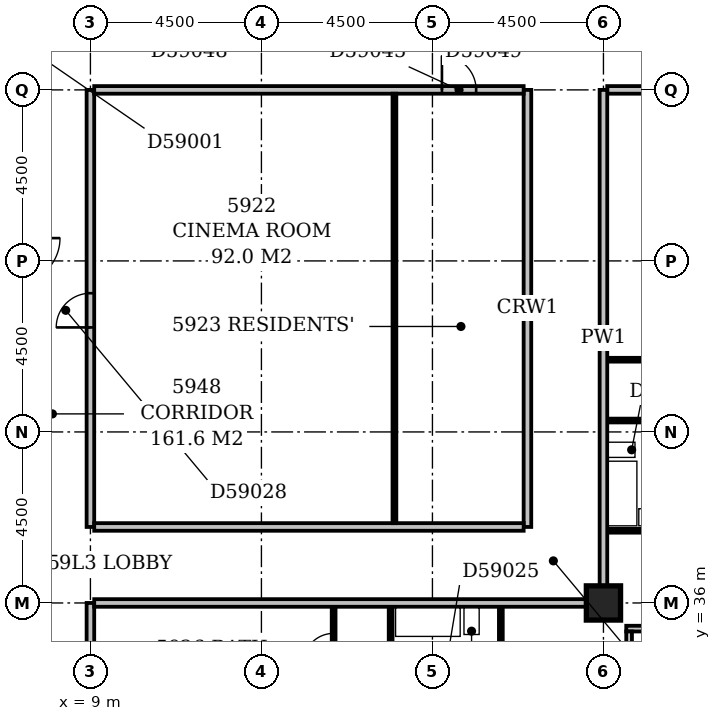
"""IFC4 building model, lengths in metres.
Left out: names, types, materials, properties, quantities, classifications, styles, units other than length and angle.
Written with IfcOpenShell. Run it as: python <this file> out.ifc"""

import sys

from ifc_helpers import new_model, si_unit, direction, frame, frame_2d, origin, origin_2d, place, context, subcontext, project, spatial, rectangle, extrude, element, fill, save


model = new_model("IFC4")
c1 = context("Model", 3, precision=1e-05, world=origin(), true_north=direction((0.0, 1.0)))
c2 = subcontext(c1, "Body", "Model", "MODEL_VIEW")
j1 = project(units=[si_unit("LENGTHUNIT", "METRE"), si_unit("PLANEANGLEUNIT", "RADIAN")], contexts=[c1])
p1 = place(None, origin())
s1 = spatial("IfcSite", under=j1, at=p1, CompositionType="ELEMENT")
p2 = place(p1, origin())
s2 = spatial("IfcBuilding", under=s1, at=p2, CompositionType="ELEMENT")
p3 = place(p2, frame((0.0, 0.0, 229.4)))
s3 = spatial("IfcBuildingStorey", under=s2, at=p3, CompositionType="ELEMENT", Elevation=229.4)
p4 = place(p3, frame((22.5, 36.0, -0.3), z_axis=(0.0, 0.0, 1.0), x_axis=(1.0, 0.0, 0.0)))
e1 = element("IfcColumn", 1, at=p4, inside=s3, PredefinedType="COLUMN", context=c2, shape_type="SweptSolid", body=[
    extrude(rectangle(XDim=0.9, YDim=0.9, at=origin_2d()), origin(), (0.0, 0.0, 1.0), 3.55),
])
p5 = place(p3, frame((23.175, 17.4, 0.0), z_axis=(0.0, 0.0, 1.0), x_axis=(0.0, 1.0, 0.0)))
e2 = element("IfcWall", 2, at=p5, inside=s3, PredefinedType="STANDARD", context=c2, shape_type="SweptSolid", body=[
    extrude(rectangle(XDim=17.85, YDim=0.15, at=frame_2d((8.925, 0.0))), origin(), (0.0, 0.0, 1.0), 2.7),
])
p6 = place(p5, frame((2.876, 0.0, 0.6)))
e3 = element("IfcOpeningElement", 3, at=p6, cuts=e2, PredefinedType="OPENING", context=c2, shape_type="SweptSolid", body=[
    extrude(rectangle(XDim=1.5, YDim=1.8, at=frame_2d((0.75, 0.9))), frame((0.0, 0.087, 0.0), z_axis=(0.0, -1.0, 0.0), x_axis=(1.0, 0.0, 0.0)), (0.0, 0.0, 1.0), 0.174),
])
p7 = place(p5, frame((6.15, 0.0, 0.6)))
e4 = element("IfcOpeningElement", 4, at=p7, cuts=e2, PredefinedType="OPENING", context=c2, shape_type="SweptSolid", body=[
    extrude(rectangle(XDim=2.4, YDim=1.8, at=frame_2d((1.2, 0.9))), frame((0.0, 0.087, 0.0), z_axis=(0.0, -1.0, 0.0), x_axis=(1.0, 0.0, 0.0)), (0.0, 0.0, 1.0), 0.174),
])
p8 = place(p5, frame((10.65, 0.0, 0.6)))
e5 = element("IfcOpeningElement", 5, at=p8, cuts=e2, PredefinedType="OPENING", context=c2, shape_type="SweptSolid", body=[
    extrude(rectangle(XDim=2.4, YDim=1.8, at=frame_2d((1.2, 0.9))), frame((0.0, 0.087, 0.0), z_axis=(0.0, -1.0, 0.0), x_axis=(1.0, 0.0, 0.0)), (0.0, 0.0, 1.0), 0.174),
])
p9 = place(p5, frame((15.15, 0.0, 0.6)))
e6 = element("IfcOpeningElement", 6, at=p9, cuts=e2, PredefinedType="OPENING", context=c2, shape_type="SweptSolid", body=[
    extrude(rectangle(XDim=2.4, YDim=1.8, at=frame_2d((1.2, 0.9))), frame((0.0, 0.087, 0.0), z_axis=(0.0, -1.0, 0.0), x_axis=(1.0, 0.0, 0.0)), (0.0, 0.0, 1.0), 0.174),
])
p10 = place(p3, frame((23.1, 35.325, 0.0), z_axis=(0.0, 0.0, 1.0), x_axis=(1.0, 0.0, 0.0)))
e7 = element("IfcWall", 7, at=p10, inside=s3, PredefinedType="STANDARD", context=c2, shape_type="SweptSolid", body=[
    extrude(rectangle(XDim=27.15, YDim=0.15, at=frame_2d((13.575, 0.0))), origin(), (0.0, 0.0, 1.0), 2.7),
])
p11 = place(p10, frame((2.043, 0.0, 0.6)))
e8 = element("IfcOpeningElement", 8, at=p11, cuts=e7, PredefinedType="OPENING", context=c2, shape_type="SweptSolid", body=[
    extrude(rectangle(XDim=1.2, YDim=1.8, at=frame_2d((0.6, 0.9))), frame((0.0, 0.087, 0.0), z_axis=(0.0, -1.0, 0.0), x_axis=(1.0, 0.0, 0.0)), (0.0, 0.0, 1.0), 0.174),
])
p12 = place(p10, frame((4.95, 0.0, 0.6)))
e9 = element("IfcOpeningElement", 9, at=p12, cuts=e7, PredefinedType="OPENING", context=c2, shape_type="SweptSolid", body=[
    extrude(rectangle(XDim=2.4, YDim=1.8, at=frame_2d((1.2, 0.9))), frame((0.0, 0.087, 0.0), z_axis=(0.0, -1.0, 0.0), x_axis=(1.0, 0.0, 0.0)), (0.0, 0.0, 1.0), 0.174),
])
p13 = place(p10, frame((9.45, 0.0, 0.6)))
e10 = element("IfcOpeningElement", 10, at=p13, cuts=e7, PredefinedType="OPENING", context=c2, shape_type="SweptSolid", body=[
    extrude(rectangle(XDim=2.4, YDim=1.8, at=frame_2d((1.2, 0.9))), frame((0.0, 0.087, 0.0), z_axis=(0.0, -1.0, 0.0), x_axis=(1.0, 0.0, 0.0)), (0.0, 0.0, 1.0), 0.174),
])
p14 = place(p10, frame((13.95, 0.0, 0.6)))
e11 = element("IfcOpeningElement", 11, at=p14, cuts=e7, PredefinedType="OPENING", context=c2, shape_type="SweptSolid", body=[
    extrude(rectangle(XDim=2.4, YDim=1.8, at=frame_2d((1.2, 0.9))), frame((0.0, 0.087, 0.0), z_axis=(0.0, -1.0, 0.0), x_axis=(1.0, 0.0, 0.0)), (0.0, 0.0, 1.0), 0.174),
])
p15 = place(p10, frame((18.45, 0.0, 0.6)))
e12 = element("IfcOpeningElement", 12, at=p15, cuts=e7, PredefinedType="OPENING", context=c2, shape_type="SweptSolid", body=[
    extrude(rectangle(XDim=2.4, YDim=1.8, at=frame_2d((1.2, 0.9))), frame((0.0, 0.087, 0.0), z_axis=(0.0, -1.0, 0.0), x_axis=(1.0, 0.0, 0.0)), (0.0, 0.0, 1.0), 0.174),
])
p16 = place(p10, frame((22.68, 0.0, 0.6)))
e13 = element("IfcOpeningElement", 13, at=p16, cuts=e7, PredefinedType="OPENING", context=c2, shape_type="SweptSolid", body=[
    extrude(rectangle(XDim=1.8, YDim=1.8, at=frame_2d((0.9, 0.9))), frame((0.0, 0.087, 0.0), z_axis=(0.0, -1.0, 0.0), x_axis=(1.0, 0.0, 0.0)), (0.0, 0.0, 1.0), 0.174),
])
p17 = place(p3, frame((9.0, 18.45, 0.0), z_axis=(0.0, 0.0, 1.0), x_axis=(0.0, 1.0, 0.0)))
e14 = element("IfcWall", 14, at=p17, inside=s3, PredefinedType="PARTITIONING", context=c2, shape_type="SweptSolid", body=[
    extrude(rectangle(XDim=17.55, YDim=0.2, at=frame_2d((8.775, 0.0))), origin(), (0.0, 0.0, 1.0), 3.25),
])
p18 = place(p17, frame((13.85, 0.0, 0.0)))
e15 = element("IfcOpeningElement", 15, at=p18, cuts=e14, PredefinedType="OPENING", context=c2, shape_type="SweptSolid", body=[
    extrude(rectangle(XDim=1.0, YDim=2.1, at=frame_2d((0.5, 1.05))), frame((0.0, 0.112, 0.0), z_axis=(0.0, -1.0, 0.0), x_axis=(1.0, 0.0, 0.0)), (0.0, 0.0, 1.0), 0.224),
])
p19 = place(p17, frame((3.25, 0.0, 0.0)))
e16 = element("IfcOpeningElement", 16, at=p19, cuts=e14, PredefinedType="OPENING", context=c2, shape_type="SweptSolid", body=[
    extrude(rectangle(XDim=1.0, YDim=2.1, at=frame_2d((0.5, 1.05))), frame((0.0, 0.112, 0.0), z_axis=(0.0, -1.0, 0.0), x_axis=(1.0, 0.0, 0.0)), (0.0, 0.0, 1.0), 0.224),
])
p20 = place(p3, frame((16.9, 27.1, 0.0), z_axis=(0.0, 0.0, 1.0), x_axis=(0.0, 1.0, 0.0)))
e17 = element("IfcWall", 17, at=p20, inside=s3, PredefinedType="PARTITIONING", context=c2, shape_type="SweptSolid", body=[
    extrude(rectangle(XDim=8.8, YDim=0.1, at=frame_2d((4.4, 0.0))), origin(), (0.0, 0.0, 1.0), 3.25),
])
p21 = place(p20, frame((1.7, 0.0, 0.0)))
e18 = element("IfcOpeningElement", 18, at=p21, cuts=e17, PredefinedType="OPENING", context=c2, shape_type="SweptSolid", body=[
    extrude(rectangle(XDim=0.9, YDim=2.1, at=frame_2d((0.45, 1.05))), frame((0.0, 0.062, 0.0), z_axis=(0.0, -1.0, 0.0), x_axis=(1.0, 0.0, 0.0)), (0.0, 0.0, 1.0), 0.124),
])
p22 = place(p20, frame((5.05, 0.0, 0.0)))
e19 = element("IfcOpeningElement", 19, at=p22, cuts=e17, PredefinedType="OPENING", context=c2, shape_type="SweptSolid", body=[
    extrude(rectangle(XDim=0.9, YDim=2.1, at=frame_2d((0.45, 1.05))), frame((0.0, 0.062, 0.0), z_axis=(0.0, -1.0, 0.0), x_axis=(1.0, 0.0, 0.0)), (0.0, 0.0, 1.0), 0.124),
])
p23 = place(p3, frame((15.4, 33.6, 0.0), z_axis=(0.0, 0.0, 1.0), x_axis=(0.0, 1.0, 0.0)))
e20 = element("IfcWall", 20, at=p23, inside=s3, PredefinedType="PARTITIONING", context=c2, shape_type="SweptSolid", body=[
    extrude(rectangle(XDim=2.3, YDim=0.1, at=frame_2d((1.15, 0.0))), origin(), (0.0, 0.0, 1.0), 3.25),
])
p24 = place(p23, frame((0.8, 0.0, 0.0)))
e21 = element("IfcOpeningElement", 21, at=p24, cuts=e20, PredefinedType="OPENING", context=c2, shape_type="SweptSolid", body=[
    extrude(rectangle(XDim=0.8, YDim=2.1, at=frame_2d((0.4, 1.05))), frame((0.0, 0.062, 0.0), z_axis=(0.0, -1.0, 0.0), x_axis=(1.0, 0.0, 0.0)), (0.0, 0.0, 1.0), 0.124),
])
p25 = place(p3, frame((19.8, 33.7, 0.0), z_axis=(0.0, 0.0, 1.0), x_axis=(0.0, 1.0, 0.0)))
e22 = element("IfcWall", 22, at=p25, inside=s3, PredefinedType="PLUMBINGWALL", context=c2, shape_type="SweptSolid", body=[
    extrude(rectangle(XDim=2.2, YDim=0.1, at=frame_2d((1.1, 0.0))), origin(), (0.0, 0.0, 1.0), 3.25),
])
p26 = place(p3, frame((9.1, 36.0, 0.0), z_axis=(0.0, 0.0, 1.0), x_axis=(1.0, 0.0, 0.0)))
e23 = element("IfcWall", 23, at=p26, inside=s3, PredefinedType="PARTITIONING", context=c2, shape_type="SweptSolid", body=[
    extrude(rectangle(XDim=12.95, YDim=0.2, at=frame_2d((6.475, 0.0))), origin(), (0.0, 0.0, 1.0), 3.25),
])
p27 = place(p3, frame((22.5, 36.45, 0.0), z_axis=(0.0, 0.0, 1.0), x_axis=(0.0, 1.0, 0.0)))
e24 = element("IfcWall", 24, at=p27, inside=s3, PredefinedType="PARTITIONING", context=c2, shape_type="SweptSolid", body=[
    extrude(rectangle(XDim=13.05, YDim=0.2, at=frame_2d((6.525, 0.0))), origin(), (0.0, 0.0, 1.0), 3.25),
])
p28 = place(p3, frame((22.6, 37.9, 0.0), z_axis=(0.0, 0.0, 1.0), x_axis=(1.0, 0.0, 0.0)))
e25 = element("IfcWall", 25, at=p28, inside=s3, PredefinedType="PLUMBINGWALL", context=c2, shape_type="SweptSolid", body=[
    extrude(rectangle(XDim=2.15, YDim=0.1, at=frame_2d((1.075, 0.0))), origin(), (0.0, 0.0, 1.0), 3.25),
])
p29 = place(p3, frame((9.0, 38.0, 0.0), z_axis=(0.0, 0.0, 1.0), x_axis=(0.0, 1.0, 0.0)))
e26 = element("IfcWall", 26, at=p29, inside=s3, PredefinedType="PARTITIONING", context=c2, shape_type="SweptSolid", body=[
    extrude(rectangle(XDim=11.5, YDim=0.2, at=frame_2d((5.75, 0.0))), origin(), (0.0, 0.0, 1.0), 3.25),
])
p30 = place(p29, frame((5.25, 0.0, 0.0)))
e27 = element("IfcOpeningElement", 27, at=p30, cuts=e26, PredefinedType="OPENING", context=c2, shape_type="SweptSolid", body=[
    extrude(rectangle(XDim=0.9, YDim=2.1, at=frame_2d((0.45, 1.05))), frame((0.0, 0.112, 0.0), z_axis=(0.0, -1.0, 0.0), x_axis=(1.0, 0.0, 0.0)), (0.0, 0.0, 1.0), 0.224),
])
p31 = place(p3, frame((9.1, 38.0, 0.0), z_axis=(0.0, 0.0, 1.0), x_axis=(1.0, 0.0, 0.0)))
e28 = element("IfcWall", 28, at=p31, inside=s3, PredefinedType="PARTITIONING", context=c2, shape_type="SweptSolid", body=[
    extrude(rectangle(XDim=11.3, YDim=0.2, at=frame_2d((5.65, 0.0))), origin(), (0.0, 0.0, 1.0), 3.25),
])
p32 = place(p3, frame((20.5, 38.0, 0.0), z_axis=(0.0, 0.0, 1.0), x_axis=(0.0, 1.0, 0.0)))
e29 = element("IfcWall", 29, at=p32, inside=s3, PredefinedType="PARTITIONING", context=c2, shape_type="SweptSolid", body=[
    extrude(rectangle(XDim=11.5, YDim=0.2, at=frame_2d((5.75, 0.0))), origin(), (0.0, 0.0, 1.0), 3.25),
])
p33 = place(p3, frame((17.0, 38.1, 0.0), z_axis=(0.0, 0.0, 1.0), x_axis=(0.0, 1.0, 0.0)))
e30 = element("IfcWall", 30, at=p33, inside=s3, PredefinedType="PARTITIONING", context=c2, shape_type="SweptSolid", body=[
    extrude(rectangle(XDim=11.3, YDim=0.1, at=frame_2d((5.65, 0.0))), origin(), (0.0, 0.0, 1.0), 3.25),
])
p34 = place(p3, frame((22.6, 40.8, 0.0), z_axis=(0.0, 0.0, 1.0), x_axis=(1.0, 0.0, 0.0)))
e31 = element("IfcWall", 31, at=p34, inside=s3, PredefinedType="PARTITIONING", context=c2, shape_type="SweptSolid", body=[
    extrude(rectangle(XDim=22.3, YDim=0.1, at=frame_2d((11.15, 0.0))), origin(), (0.0, 0.0, 1.0), 3.25),
])
p35 = place(p34, frame((2.85, 0.0, 0.0)))
e32 = element("IfcOpeningElement", 32, at=p35, cuts=e31, PredefinedType="OPENING", context=c2, shape_type="SweptSolid", body=[
    extrude(rectangle(XDim=0.9, YDim=2.1, at=frame_2d((0.45, 1.05))), frame((0.0, 0.062, 0.0), z_axis=(0.0, -1.0, 0.0), x_axis=(1.0, 0.0, 0.0)), (0.0, 0.0, 1.0), 0.124),
])
p36 = place(p34, frame((8.4, 0.0, 0.0)))
e33 = element("IfcOpeningElement", 33, at=p36, cuts=e31, PredefinedType="OPENING", context=c2, shape_type="SweptSolid", body=[
    extrude(rectangle(XDim=0.9, YDim=2.1, at=frame_2d((0.45, 1.05))), frame((0.0, 0.062, 0.0), z_axis=(0.0, -1.0, 0.0), x_axis=(1.0, 0.0, 0.0)), (0.0, 0.0, 1.0), 0.124),
])
p37 = place(p34, frame((14.05, 0.0, 0.0)))
e34 = element("IfcOpeningElement", 34, at=p37, cuts=e31, PredefinedType="OPENING", context=c2, shape_type="SweptSolid", body=[
    extrude(rectangle(XDim=0.9, YDim=2.1, at=frame_2d((0.45, 1.05))), frame((0.0, 0.062, 0.0), z_axis=(0.0, -1.0, 0.0), x_axis=(1.0, 0.0, 0.0)), (0.0, 0.0, 1.0), 0.124),
])
p38 = place(p34, frame((19.7, 0.0, 0.0)))
e35 = element("IfcOpeningElement", 35, at=p38, cuts=e31, PredefinedType="OPENING", context=c2, shape_type="SweptSolid", body=[
    extrude(rectangle(XDim=0.9, YDim=2.1, at=frame_2d((0.45, 1.05))), frame((0.0, 0.062, 0.0), z_axis=(0.0, -1.0, 0.0), x_axis=(1.0, 0.0, 0.0)), (0.0, 0.0, 1.0), 0.124),
])
p39 = place(p3, frame((22.6, 42.4, 0.0), z_axis=(0.0, 0.0, 1.0), x_axis=(1.0, 0.0, 0.0)))
e36 = element("IfcWall", 36, at=p39, inside=s3, PredefinedType="PARTITIONING", context=c2, shape_type="SweptSolid", body=[
    extrude(rectangle(XDim=5.815, YDim=0.1, at=frame_2d((2.908, 0.0))), origin(), (0.0, 0.0, 1.0), 3.25),
])
p40 = place(p39, frame((2.408, 0.0, 0.0)))
e37 = element("IfcOpeningElement", 37, at=p40, cuts=e36, PredefinedType="OPENING", context=c2, shape_type="SweptSolid", body=[
    extrude(rectangle(XDim=0.9, YDim=2.1, at=frame_2d((0.45, 1.05))), frame((0.0, 0.062, 0.0), z_axis=(0.0, -1.0, 0.0), x_axis=(1.0, 0.0, 0.0)), (0.0, 0.0, 1.0), 0.124),
])
p41 = place(p3, frame((9.1, 49.5, 0.0), z_axis=(0.0, 0.0, 1.0), x_axis=(1.0, 0.0, 0.0)))
e38 = element("IfcWall", 38, at=p41, inside=s3, PredefinedType="PARTITIONING", context=c2, shape_type="SweptSolid", body=[
    extrude(rectangle(XDim=11.3, YDim=0.2, at=frame_2d((5.65, 0.0))), origin(), (0.0, 0.0, 1.0), 3.25),
])
p42 = place(p41, frame((9.15, 0.0, 0.0)))
e39 = element("IfcOpeningElement", 39, at=p42, cuts=e38, PredefinedType="OPENING", context=c2, shape_type="SweptSolid", body=[
    extrude(rectangle(XDim=0.9, YDim=2.1, at=frame_2d((0.45, 1.05))), frame((0.0, 0.112, 0.0), z_axis=(0.0, -1.0, 0.0), x_axis=(1.0, 0.0, 0.0)), (0.0, 0.0, 1.0), 0.224),
])
p43 = place(p3, frame((22.6, 49.5, 0.0), z_axis=(0.0, 0.0, 1.0), x_axis=(1.0, 0.0, 0.0)))
e40 = element("IfcWall", 40, at=p43, inside=s3, PredefinedType="PARTITIONING", context=c2, shape_type="SweptSolid", body=[
    extrude(rectangle(XDim=30.95, YDim=0.2, at=frame_2d((15.475, 0.0))), origin(), (0.0, 0.0, 1.0), 3.25),
])
p44 = place(p43, frame((6.115, 0.0, 0.0)))
e41 = element("IfcOpeningElement", 41, at=p44, cuts=e40, PredefinedType="OPENING", context=c2, shape_type="SweptSolid", body=[
    extrude(rectangle(XDim=1.0, YDim=2.1, at=frame_2d((0.5, 1.05))), frame((0.0, 0.112, 0.0), z_axis=(0.0, -1.0, 0.0), x_axis=(1.0, 0.0, 0.0)), (0.0, 0.0, 1.0), 0.224),
])
p45 = place(p43, frame((22.8, 0.0, 0.0)))
e42 = element("IfcOpeningElement", 42, at=p45, cuts=e40, PredefinedType="OPENING", context=c2, shape_type="SweptSolid", body=[
    extrude(rectangle(XDim=1.0, YDim=2.1, at=frame_2d((0.5, 1.05))), frame((0.0, 0.112, 0.0), z_axis=(0.0, -1.0, 0.0), x_axis=(1.0, 0.0, 0.0)), (0.0, 0.0, 1.0), 0.224),
])
p46 = place(p24, origin())
e43 = element("IfcDoor", 43, at=p46, inside=s3, OperationType="SINGLE_SWING_LEFT", PredefinedType="DOOR", context=c2, shape_type="SweptSolid", body=[
    extrude(rectangle(XDim=0.8, YDim=2.1, at=frame_2d((0.4, 1.05))), frame((0.0, 0.025, 0.0), z_axis=(0.0, -1.0, 0.0), x_axis=(1.0, 0.0, 0.0)), (0.0, 0.0, 1.0), 0.05),
])
fill(e21, e43)
p47 = place(p30, origin())
e44 = element("IfcDoor", 44, at=p47, inside=s3, OperationType="SINGLE_SWING_LEFT", PredefinedType="DOOR", context=c2, shape_type="SweptSolid", body=[
    extrude(rectangle(XDim=0.9, YDim=2.1, at=frame_2d((0.45, 1.05))), frame((0.0, 0.025, 0.0), z_axis=(0.0, -1.0, 0.0), x_axis=(1.0, 0.0, 0.0)), (0.0, 0.0, 1.0), 0.05),
])
fill(e27, e44)
p48 = place(p42, origin())
e45 = element("IfcDoor", 45, at=p48, inside=s3, OperationType="SINGLE_SWING_LEFT", PredefinedType="DOOR", context=c2, shape_type="SweptSolid", body=[
    extrude(rectangle(XDim=0.9, YDim=2.1, at=frame_2d((0.45, 1.05))), frame((0.0, 0.025, 0.0), z_axis=(0.0, -1.0, 0.0), x_axis=(1.0, 0.0, 0.0)), (0.0, 0.0, 1.0), 0.05),
])
fill(e39, e45)
save(model, sys.argv[1])
